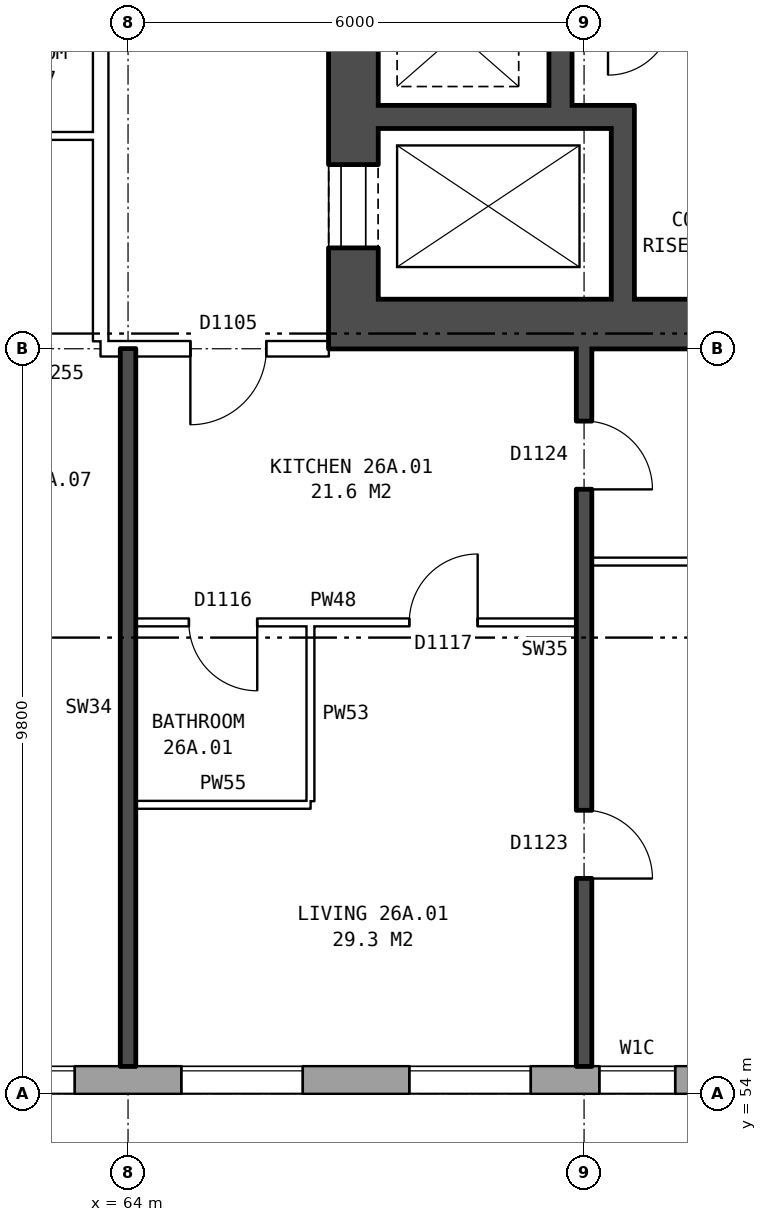
"""IFC4 building model, lengths in metres.
Left out: names, types, materials, properties, quantities, classifications, styles, units other than length and angle.
Written with IfcOpenShell. Run it as: python <this file> out.ifc"""

import sys

from ifc_helpers import new_model, si_unit, direction, frame, frame_2d, origin, place, context, subcontext, project, spatial, rectangle, extrude, element, fill, save


model = new_model("IFC4")
c1 = context("Model", 3, precision=1e-05, world=origin(), true_north=direction((0.0, 1.0)))
c2 = subcontext(c1, "Body", "Model", "MODEL_VIEW")
j1 = project(units=[si_unit("LENGTHUNIT", "METRE"), si_unit("PLANEANGLEUNIT", "RADIAN")], contexts=[c1])
p1 = place(None, origin())
s1 = spatial("IfcSite", under=j1, at=p1, CompositionType="ELEMENT")
p2 = place(p1, origin())
s2 = spatial("IfcBuilding", under=s1, at=p2, CompositionType="ELEMENT")
p3 = place(p2, frame((0.0, 0.0, 96.4)))
s3 = spatial("IfcBuildingStorey", under=s2, at=p3, CompositionType="ELEMENT", Elevation=96.4)
p4 = place(p3, frame((28.075, 54.18, 0.0), z_axis=(0.0, 0.0, 1.0), x_axis=(1.0, 0.0, 0.0)))
e1 = element("IfcWall", 1, at=p4, inside=s3, PredefinedType="STANDARD", context=c2, shape_type="SweptSolid", body=[
    extrude(rectangle(XDim=44.851, YDim=0.36, at=frame_2d((22.425, 0.0))), origin(), (0.0, 0.0, 1.0), 2.85),
])
p5 = place(p4, frame((0.4, 0.0, 0.8)))
e2 = element("IfcOpeningElement", 2, at=p5, cuts=e1, PredefinedType="OPENING", context=c2, shape_type="SweptSolid", body=[
    extrude(rectangle(XDim=0.8, YDim=0.9, at=frame_2d((0.4, 0.45))), frame((0.0, 0.19, 0.0), z_axis=(0.0, -1.0, 0.0), x_axis=(1.0, 0.0, 0.0)), (0.0, 0.0, 1.0), 0.38),
])
p6 = place(p4, frame((3.625, 0.0, 0.8)))
e3 = element("IfcOpeningElement", 3, at=p6, cuts=e1, PredefinedType="OPENING", context=c2, shape_type="SweptSolid", body=[
    extrude(rectangle(XDim=1.6, YDim=1.8, at=frame_2d((0.8, 0.9))), frame((0.0, 0.19, 0.0), z_axis=(0.0, -1.0, 0.0), x_axis=(1.0, 0.0, 0.0)), (0.0, 0.0, 1.0), 0.38),
])
p7 = place(p4, frame((6.625, 0.0, 0.8)))
e4 = element("IfcOpeningElement", 4, at=p7, cuts=e1, PredefinedType="OPENING", context=c2, shape_type="SweptSolid", body=[
    extrude(rectangle(XDim=1.6, YDim=1.8, at=frame_2d((0.8, 0.9))), frame((0.0, 0.19, 0.0), z_axis=(0.0, -1.0, 0.0), x_axis=(1.0, 0.0, 0.0)), (0.0, 0.0, 1.0), 0.38),
])
p8 = place(p4, frame((9.625, 0.0, 0.8)))
e5 = element("IfcOpeningElement", 5, at=p8, cuts=e1, PredefinedType="OPENING", context=c2, shape_type="SweptSolid", body=[
    extrude(rectangle(XDim=1.6, YDim=1.8, at=frame_2d((0.8, 0.9))), frame((0.0, 0.19, 0.0), z_axis=(0.0, -1.0, 0.0), x_axis=(1.0, 0.0, 0.0)), (0.0, 0.0, 1.0), 0.38),
])
p9 = place(p4, frame((12.625, 0.0, 0.8)))
e6 = element("IfcOpeningElement", 6, at=p9, cuts=e1, PredefinedType="OPENING", context=c2, shape_type="SweptSolid", body=[
    extrude(rectangle(XDim=1.6, YDim=1.8, at=frame_2d((0.8, 0.9))), frame((0.0, 0.19, 0.0), z_axis=(0.0, -1.0, 0.0), x_axis=(1.0, 0.0, 0.0)), (0.0, 0.0, 1.0), 0.38),
])
p10 = place(p4, frame((15.625, 0.0, 0.8)))
e7 = element("IfcOpeningElement", 7, at=p10, cuts=e1, PredefinedType="OPENING", context=c2, shape_type="SweptSolid", body=[
    extrude(rectangle(XDim=1.6, YDim=1.8, at=frame_2d((0.8, 0.9))), frame((0.0, 0.19, 0.0), z_axis=(0.0, -1.0, 0.0), x_axis=(1.0, 0.0, 0.0)), (0.0, 0.0, 1.0), 0.38),
])
p11 = place(p4, frame((18.625, 0.0, 0.8)))
e8 = element("IfcOpeningElement", 8, at=p11, cuts=e1, PredefinedType="OPENING", context=c2, shape_type="SweptSolid", body=[
    extrude(rectangle(XDim=1.6, YDim=1.8, at=frame_2d((0.8, 0.9))), frame((0.0, 0.19, 0.0), z_axis=(0.0, -1.0, 0.0), x_axis=(1.0, 0.0, 0.0)), (0.0, 0.0, 1.0), 0.38),
])
p12 = place(p4, frame((21.625, 0.0, 0.8)))
e9 = element("IfcOpeningElement", 9, at=p12, cuts=e1, PredefinedType="OPENING", context=c2, shape_type="SweptSolid", body=[
    extrude(rectangle(XDim=1.6, YDim=1.8, at=frame_2d((0.8, 0.9))), frame((0.0, 0.19, 0.0), z_axis=(0.0, -1.0, 0.0), x_axis=(1.0, 0.0, 0.0)), (0.0, 0.0, 1.0), 0.38),
])
p13 = place(p4, frame((24.625, 0.0, 0.8)))
e10 = element("IfcOpeningElement", 10, at=p13, cuts=e1, PredefinedType="OPENING", context=c2, shape_type="SweptSolid", body=[
    extrude(rectangle(XDim=1.6, YDim=1.8, at=frame_2d((0.8, 0.9))), frame((0.0, 0.19, 0.0), z_axis=(0.0, -1.0, 0.0), x_axis=(1.0, 0.0, 0.0)), (0.0, 0.0, 1.0), 0.38),
])
p14 = place(p4, frame((27.625, 0.0, 0.8)))
e11 = element("IfcOpeningElement", 11, at=p14, cuts=e1, PredefinedType="OPENING", context=c2, shape_type="SweptSolid", body=[
    extrude(rectangle(XDim=1.6, YDim=1.8, at=frame_2d((0.8, 0.9))), frame((0.0, 0.19, 0.0), z_axis=(0.0, -1.0, 0.0), x_axis=(1.0, 0.0, 0.0)), (0.0, 0.0, 1.0), 0.38),
])
p15 = place(p4, frame((30.625, 0.0, 0.8)))
e12 = element("IfcOpeningElement", 12, at=p15, cuts=e1, PredefinedType="OPENING", context=c2, shape_type="SweptSolid", body=[
    extrude(rectangle(XDim=1.6, YDim=1.8, at=frame_2d((0.8, 0.9))), frame((0.0, 0.19, 0.0), z_axis=(0.0, -1.0, 0.0), x_axis=(1.0, 0.0, 0.0)), (0.0, 0.0, 1.0), 0.38),
])
p16 = place(p4, frame((33.625, 0.0, 0.8)))
e13 = element("IfcOpeningElement", 13, at=p16, cuts=e1, PredefinedType="OPENING", context=c2, shape_type="SweptSolid", body=[
    extrude(rectangle(XDim=1.6, YDim=1.8, at=frame_2d((0.8, 0.9))), frame((0.0, 0.19, 0.0), z_axis=(0.0, -1.0, 0.0), x_axis=(1.0, 0.0, 0.0)), (0.0, 0.0, 1.0), 0.38),
])
p17 = place(p4, frame((36.625, 0.0, 0.8)))
e14 = element("IfcOpeningElement", 14, at=p17, cuts=e1, PredefinedType="OPENING", context=c2, shape_type="SweptSolid", body=[
    extrude(rectangle(XDim=1.6, YDim=1.8, at=frame_2d((0.8, 0.9))), frame((0.0, 0.19, 0.0), z_axis=(0.0, -1.0, 0.0), x_axis=(1.0, 0.0, 0.0)), (0.0, 0.0, 1.0), 0.38),
])
p18 = place(p4, frame((39.625, 0.0, 0.8)))
e15 = element("IfcOpeningElement", 15, at=p18, cuts=e1, PredefinedType="OPENING", context=c2, shape_type="SweptSolid", body=[
    extrude(rectangle(XDim=1.6, YDim=1.8, at=frame_2d((0.8, 0.9))), frame((0.0, 0.19, 0.0), z_axis=(0.0, -1.0, 0.0), x_axis=(1.0, 0.0, 0.0)), (0.0, 0.0, 1.0), 0.38),
])
p19 = place(p4, frame((42.125, 0.0, 0.8)))
e16 = element("IfcOpeningElement", 16, at=p19, cuts=e1, PredefinedType="OPENING", context=c2, shape_type="SweptSolid", body=[
    extrude(rectangle(XDim=1.0, YDim=1.8, at=frame_2d((0.5, 0.9))), frame((0.0, 0.19, 0.0), z_axis=(0.0, -1.0, 0.0), x_axis=(1.0, 0.0, 0.0)), (0.0, 0.0, 1.0), 0.38),
])
p20 = place(p4, frame((1.65, 0.0, 0.8)))
e17 = element("IfcOpeningElement", 17, at=p20, cuts=e1, PredefinedType="OPENING", context=c2, shape_type="SweptSolid", body=[
    extrude(rectangle(XDim=1.6, YDim=1.8, at=frame_2d((0.8, 0.9))), frame((0.0, 0.19, 0.0), z_axis=(0.0, -1.0, 0.0), x_axis=(1.0, 0.0, 0.0)), (0.0, 0.0, 1.0), 0.38),
])
p21 = place(p4, frame((43.425, 0.0, 0.8)))
e18 = element("IfcOpeningElement", 18, at=p21, cuts=e1, PredefinedType="OPENING", context=c2, shape_type="SweptSolid", body=[
    extrude(rectangle(XDim=1.0, YDim=0.9, at=frame_2d((0.5, 0.45))), frame((0.0, 0.19, 0.0), z_axis=(0.0, -1.0, 0.0), x_axis=(1.0, 0.0, 0.0)), (0.0, 0.0, 1.0), 0.38),
])
p22 = place(p3, frame((66.965, 64.45, 0.0), z_axis=(0.0, 0.0, 1.0), x_axis=(0.0, 1.0, 0.0)))
e19 = element("IfcWall", 19, at=p22, inside=s3, PredefinedType="SHEAR", context=c2, shape_type="SweptSolid", body=[
    extrude(rectangle(XDim=11.1, YDim=0.65, at=frame_2d((5.55, 0.0))), origin(), (0.0, 0.0, 1.0), 2.85),
])
p23 = place(p22, frame((0.675, 0.0, 0.0)))
e20 = element("IfcOpeningElement", 20, at=p23, cuts=e19, PredefinedType="OPENING", context=c2, shape_type="SweptSolid", body=[
    extrude(rectangle(XDim=1.1, YDim=2.1, at=frame_2d((0.55, 1.05))), frame((0.0, 0.335, 0.0), z_axis=(0.0, -1.0, 0.0), x_axis=(1.0, 0.0, 0.0)), (0.0, 0.0, 1.0), 0.67),
])
p24 = place(p22, frame((9.25, 0.0, 0.0)))
e21 = element("IfcOpeningElement", 21, at=p24, cuts=e19, PredefinedType="OPENING", context=c2, shape_type="SweptSolid", body=[
    extrude(rectangle(XDim=1.1, YDim=2.1, at=frame_2d((0.55, 1.05))), frame((0.0, 0.335, 0.0), z_axis=(0.0, -1.0, 0.0), x_axis=(1.0, 0.0, 0.0)), (0.0, 0.0, 1.0), 0.67),
])
p25 = place(p3, frame((66.64, 64.125, 0.0), z_axis=(0.0, 0.0, 1.0), x_axis=(1.0, 0.0, 0.0)))
e22 = element("IfcWall", 22, at=p25, inside=s3, PredefinedType="SHEAR", context=c2, shape_type="SweptSolid", body=[
    extrude(rectangle(XDim=9.0, YDim=0.65, at=frame_2d((4.5, 0.0))), origin(), (0.0, 0.0, 1.0), 2.85),
])
p26 = place(p3, frame((67.29, 66.85, 0.0), z_axis=(0.0, 0.0, 1.0), x_axis=(1.0, 0.0, 0.0)))
e23 = element("IfcWall", 23, at=p26, inside=s3, PredefinedType="SHEAR", context=c2, shape_type="SweptSolid", body=[
    extrude(rectangle(XDim=3.37, YDim=0.3, at=frame_2d((1.685, 0.0))), origin(), (0.0, 0.0, 1.0), 2.85),
])
p27 = place(p3, frame((69.69, 67.0, 0.0), z_axis=(0.0, 0.0, 1.0), x_axis=(0.0, 1.0, 0.0)))
e24 = element("IfcWall", 24, at=p27, inside=s3, PredefinedType="SHEAR", context=c2, shape_type="SweptSolid", body=[
    extrude(rectangle(XDim=6.6, YDim=0.3, at=frame_2d((3.3, 0.0))), origin(), (0.0, 0.0, 1.0), 2.85),
])
p28 = place(p3, frame((70.51, 64.45, 0.0), z_axis=(0.0, 0.0, 1.0), x_axis=(0.0, 1.0, 0.0)))
e25 = element("IfcWall", 25, at=p28, inside=s3, PredefinedType="SHEAR", context=c2, shape_type="SweptSolid", body=[
    extrude(rectangle(XDim=2.25, YDim=0.3, at=frame_2d((1.125, 0.0))), origin(), (0.0, 0.0, 1.0), 2.85),
])
p29 = place(p3, frame((63.64, 63.9, 0.0), z_axis=(0.0, 0.0, 1.0), x_axis=(0.0, 1.0, 0.0)))
e26 = element("IfcWall", 26, at=p29, inside=s3, PredefinedType="PARTITIONING", context=c2, shape_type="SweptSolid", body=[
    extrude(rectangle(XDim=12.2, YDim=0.2, at=frame_2d((6.1, 0.0))), origin(), (0.0, 0.0, 1.0), 2.85),
])
p30 = place(p29, frame((5.1, 0.0, 0.0)))
e27 = element("IfcOpeningElement", 27, at=p30, cuts=e26, PredefinedType="OPENING", context=c2, shape_type="SweptSolid", body=[
    extrude(rectangle(XDim=2.0, YDim=2.1, at=frame_2d((1.0, 1.05))), frame((0.0, 0.11, 0.0), z_axis=(0.0, -1.0, 0.0), x_axis=(1.0, 0.0, 0.0)), (0.0, 0.0, 1.0), 0.22),
])
p31 = place(p3, frame((64.1, 57.8, 0.0), z_axis=(0.0, 0.0, 1.0), x_axis=(1.0, 0.0, 0.0)))
e28 = element("IfcWall", 28, at=p31, inside=s3, PredefinedType="PARTITIONING", context=c2, shape_type="SweptSolid", body=[
    extrude(rectangle(XDim=2.3, YDim=0.1, at=frame_2d((1.15, 0.0))), origin(), (0.0, 0.0, 1.0), 2.85),
])
p32 = place(p3, frame((64.1, 60.2, 0.0), z_axis=(0.0, 0.0, 1.0), x_axis=(1.0, 0.0, 0.0)))
e29 = element("IfcWall", 29, at=p32, inside=s3, PredefinedType="PARTITIONING", context=c2, shape_type="SweptSolid", body=[
    extrude(rectangle(XDim=5.8, YDim=0.1, at=frame_2d((2.9, 0.0))), origin(), (0.0, 0.0, 1.0), 2.85),
])
p33 = place(p32, frame((3.6, 0.0, 0.0)))
e30 = element("IfcOpeningElement", 30, at=p33, cuts=e29, PredefinedType="OPENING", context=c2, shape_type="SweptSolid", body=[
    extrude(rectangle(XDim=0.9, YDim=2.1, at=frame_2d((0.45, 1.05))), frame((0.0, 0.06, 0.0), z_axis=(0.0, -1.0, 0.0), x_axis=(1.0, 0.0, 0.0)), (0.0, 0.0, 1.0), 0.12),
])
p34 = place(p32, frame((0.7, 0.0, 0.0)))
e31 = element("IfcOpeningElement", 31, at=p34, cuts=e29, PredefinedType="OPENING", context=c2, shape_type="SweptSolid", body=[
    extrude(rectangle(XDim=0.9, YDim=2.1, at=frame_2d((0.45, 1.05))), frame((0.0, 0.06, 0.0), z_axis=(0.0, -1.0, 0.0), x_axis=(1.0, 0.0, 0.0)), (0.0, 0.0, 1.0), 0.12),
])
p35 = place(p3, frame((70.1, 61.0, 0.0), z_axis=(0.0, 0.0, 1.0), x_axis=(1.0, 0.0, 0.0)))
e32 = element("IfcWall", 32, at=p35, inside=s3, PredefinedType="PARTITIONING", context=c2, shape_type="SweptSolid", body=[
    extrude(rectangle(XDim=5.54, YDim=0.1, at=frame_2d((2.77, 0.0))), origin(), (0.0, 0.0, 1.0), 2.85),
])
p36 = place(p3, frame((63.64, 63.8, 0.0), z_axis=(0.0, 0.0, 1.0), x_axis=(1.0, 0.0, 0.0)))
e33 = element("IfcWall", 33, at=p36, inside=s3, PredefinedType="PARTITIONING", context=c2, shape_type="SweptSolid", body=[
    extrude(rectangle(XDim=3.0, YDim=0.2, at=frame_2d((1.5, 0.0))), origin(), (0.0, 0.0, 1.0), 2.85),
])
p37 = place(p36, frame((1.18, 0.0, 0.0)))
e34 = element("IfcOpeningElement", 34, at=p37, cuts=e33, PredefinedType="OPENING", context=c2, shape_type="SweptSolid", body=[
    extrude(rectangle(XDim=1.0, YDim=2.1, at=frame_2d((0.5, 1.05))), frame((0.0, 0.11, 0.0), z_axis=(0.0, -1.0, 0.0), x_axis=(1.0, 0.0, 0.0)), (0.0, 0.0, 1.0), 0.22),
])
p38 = place(p3, frame((61.0, 66.6, 0.0), z_axis=(0.0, 0.0, 1.0), x_axis=(1.0, 0.0, 0.0)))
e35 = element("IfcWall", 35, at=p38, inside=s3, PredefinedType="PARTITIONING", context=c2, shape_type="SweptSolid", body=[
    extrude(rectangle(XDim=2.64, YDim=0.1, at=frame_2d((1.32, 0.0))), origin(), (0.0, 0.0, 1.0), 2.85),
])
p39 = place(p3, frame((64.0, 54.36, 0.0), z_axis=(0.0, 0.0, 1.0), x_axis=(0.0, 1.0, 0.0)))
e36 = element("IfcWall", 36, at=p39, inside=s3, PredefinedType="SOLIDWALL", context=c2, shape_type="SweptSolid", body=[
    extrude(rectangle(XDim=9.44, YDim=0.2, at=frame_2d((4.72, 0.0))), origin(), (0.0, 0.0, 1.0), 2.85),
])
p40 = place(p3, frame((66.4, 57.85, 0.0), z_axis=(0.0, 0.0, 1.0), x_axis=(0.0, 1.0, 0.0)))
e37 = element("IfcWall", 37, at=p40, inside=s3, PredefinedType="PARTITIONING", context=c2, shape_type="SweptSolid", body=[
    extrude(rectangle(XDim=2.3, YDim=0.1, at=frame_2d((1.15, 0.0))), origin(), (0.0, 0.0, 1.0), 2.85),
])
p41 = place(p3, frame((70.0, 54.36, 0.0), z_axis=(0.0, 0.0, 1.0), x_axis=(0.0, 1.0, 0.0)))
e38 = element("IfcWall", 38, at=p41, inside=s3, PredefinedType="SOLIDWALL", context=c2, shape_type="SweptSolid", body=[
    extrude(rectangle(XDim=9.44, YDim=0.2, at=frame_2d((4.72, 0.0))), origin(), (0.0, 0.0, 1.0), 2.85),
])
p42 = place(p41, frame((2.47, 0.0, 0.0)))
e39 = element("IfcOpeningElement", 39, at=p42, cuts=e38, PredefinedType="OPENING", context=c2, shape_type="SweptSolid", body=[
    extrude(rectangle(XDim=0.9, YDim=2.1, at=frame_2d((0.45, 1.05))), frame((0.0, 0.11, 0.0), z_axis=(0.0, -1.0, 0.0), x_axis=(1.0, 0.0, 0.0)), (0.0, 0.0, 1.0), 0.22),
])
p43 = place(p41, frame((7.59, 0.0, 0.0)))
e40 = element("IfcOpeningElement", 40, at=p43, cuts=e38, PredefinedType="OPENING", context=c2, shape_type="SweptSolid", body=[
    extrude(rectangle(XDim=0.9, YDim=2.1, at=frame_2d((0.45, 1.05))), frame((0.0, 0.11, 0.0), z_axis=(0.0, -1.0, 0.0), x_axis=(1.0, 0.0, 0.0)), (0.0, 0.0, 1.0), 0.22),
])
p44 = place(p16, origin())
e41 = element("IfcWindow", 41, at=p44, inside=s3, PartitioningType="SINGLE_PANEL", PredefinedType="WINDOW", context=c2, shape_type="SweptSolid", body=[
    extrude(rectangle(XDim=1.6, YDim=1.8, at=frame_2d((0.8, 0.9))), frame((0.0, 0.15, 0.0), z_axis=(0.0, -1.0, 0.0), x_axis=(1.0, 0.0, 0.0)), (0.0, 0.0, 1.0), 0.06),
])
fill(e13, e41)
p45 = place(p17, origin())
e42 = element("IfcWindow", 42, at=p45, inside=s3, PartitioningType="SINGLE_PANEL", PredefinedType="WINDOW", context=c2, shape_type="SweptSolid", body=[
    extrude(rectangle(XDim=1.6, YDim=1.8, at=frame_2d((0.8, 0.9))), frame((0.0, 0.15, 0.0), z_axis=(0.0, -1.0, 0.0), x_axis=(1.0, 0.0, 0.0)), (0.0, 0.0, 1.0), 0.06),
])
fill(e14, e42)
p46 = place(p18, origin())
e43 = element("IfcWindow", 43, at=p46, inside=s3, PartitioningType="SINGLE_PANEL", PredefinedType="WINDOW", context=c2, shape_type="SweptSolid", body=[
    extrude(rectangle(XDim=1.6, YDim=1.8, at=frame_2d((0.8, 0.9))), frame((0.0, 0.15, 0.0), z_axis=(0.0, -1.0, 0.0), x_axis=(1.0, 0.0, 0.0)), (0.0, 0.0, 1.0), 0.06),
])
fill(e15, e43)
p47 = place(p19, origin())
e44 = element("IfcWindow", 44, at=p47, inside=s3, PartitioningType="SINGLE_PANEL", PredefinedType="WINDOW", context=c2, shape_type="SweptSolid", body=[
    extrude(rectangle(XDim=1.0, YDim=1.8, at=frame_2d((0.5, 0.9))), frame((0.0, 0.15, 0.0), z_axis=(0.0, -1.0, 0.0), x_axis=(1.0, 0.0, 0.0)), (0.0, 0.0, 1.0), 0.06),
])
fill(e16, e44)
p48 = place(p23, origin())
e45 = element("IfcDoor", 45, at=p48, inside=s3, OperationType="DOUBLE_DOOR_SLIDING", PredefinedType="DOOR", context=c2, shape_type="SweptSolid", body=[
    extrude(rectangle(XDim=1.1, YDim=2.1, at=frame_2d((0.55, 1.05))), frame((0.0, -0.26, 0.0), z_axis=(0.0, -1.0, 0.0), x_axis=(1.0, 0.0, 0.0)), (0.0, 0.0, 1.0), 0.05),
])
fill(e20, e45)
p49 = place(p42, frame((0.9, 0.0, 0.0), z_axis=(0.0, 0.0, 1.0), x_axis=(-1.0, 0.0, 0.0)))
e46 = element("IfcDoor", 46, at=p49, inside=s3, OperationType="SINGLE_SWING_RIGHT", PredefinedType="DOOR", context=c2, shape_type="SweptSolid", body=[
    extrude(rectangle(XDim=0.9, YDim=2.1, at=frame_2d((0.45, 1.05))), frame((0.0, 0.025, 0.0), z_axis=(0.0, -1.0, 0.0), x_axis=(1.0, 0.0, 0.0)), (0.0, 0.0, 1.0), 0.05),
])
fill(e39, e46)
p50 = place(p43, frame((0.9, 0.0, 0.0), z_axis=(0.0, 0.0, 1.0), x_axis=(-1.0, 0.0, 0.0)))
e47 = element("IfcDoor", 47, at=p50, inside=s3, OperationType="SINGLE_SWING_RIGHT", PredefinedType="DOOR", context=c2, shape_type="SweptSolid", body=[
    extrude(rectangle(XDim=0.9, YDim=2.1, at=frame_2d((0.45, 1.05))), frame((0.0, 0.025, 0.0), z_axis=(0.0, -1.0, 0.0), x_axis=(1.0, 0.0, 0.0)), (0.0, 0.0, 1.0), 0.05),
])
fill(e40, e47)
p51 = place(p37, frame((1.0, 0.0, 0.0), z_axis=(0.0, 0.0, 1.0), x_axis=(-1.0, 0.0, 0.0)))
e48 = element("IfcDoor", 48, at=p51, inside=s3, OperationType="SINGLE_SWING_RIGHT", PredefinedType="DOOR", context=c2, shape_type="SweptSolid", body=[
    extrude(rectangle(XDim=1.0, YDim=2.1, at=frame_2d((0.5, 1.05))), frame((0.0, 0.025, 0.0), z_axis=(0.0, -1.0, 0.0), x_axis=(1.0, 0.0, 0.0)), (0.0, 0.0, 1.0), 0.05),
])
fill(e34, e48)
p52 = place(p33, origin())
e49 = element("IfcDoor", 49, at=p52, inside=s3, OperationType="SINGLE_SWING_RIGHT", PredefinedType="DOOR", context=c2, shape_type="SweptSolid", body=[
    extrude(rectangle(XDim=0.9, YDim=2.1, at=frame_2d((0.45, 1.05))), frame((0.0, 0.025, 0.0), z_axis=(0.0, -1.0, 0.0), x_axis=(1.0, 0.0, 0.0)), (0.0, 0.0, 1.0), 0.05),
])
fill(e30, e49)
p53 = place(p34, frame((0.9, 0.0, 0.0), z_axis=(0.0, 0.0, 1.0), x_axis=(-1.0, 0.0, 0.0)))
e50 = element("IfcDoor", 50, at=p53, inside=s3, OperationType="SINGLE_SWING_LEFT", PredefinedType="DOOR", context=c2, shape_type="SweptSolid", body=[
    extrude(rectangle(XDim=0.9, YDim=2.1, at=frame_2d((0.45, 1.05))), frame((0.0, 0.025, 0.0), z_axis=(0.0, -1.0, 0.0), x_axis=(1.0, 0.0, 0.0)), (0.0, 0.0, 1.0), 0.05),
])
fill(e31, e50)
save(model, sys.argv[1])
